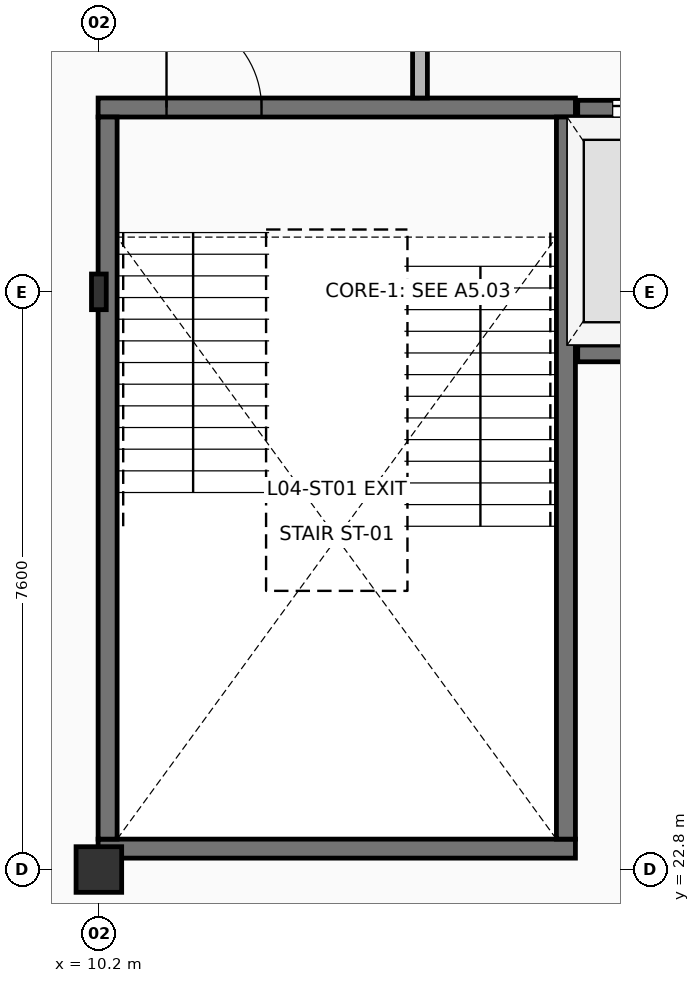
"""IFC4 building model, lengths in metres.
Left out: names, types, materials, properties, quantities, classifications, styles, units other than length and angle.
Written with IfcOpenShell. Run it as: python <this file> out.ifc"""

import sys

from ifc_helpers import new_model, si_unit, direction, frame, frame_2d, origin, origin_2d, place, context, subcontext, project, spatial, rectangle, i_section, extrude, element, fill, save


model = new_model("IFC4")
c1 = context("Model", 3, precision=1e-05, world=origin(), true_north=direction((0.0, 1.0)))
c2 = subcontext(c1, "Body", "Model", "MODEL_VIEW")
j1 = project(units=[si_unit("LENGTHUNIT", "METRE"), si_unit("PLANEANGLEUNIT", "RADIAN")], contexts=[c1])
p1 = place(None, origin())
s1 = spatial("IfcSite", under=j1, at=p1, CompositionType="ELEMENT")
p2 = place(p1, origin())
s2 = spatial("IfcBuilding", under=s1, at=p2, CompositionType="ELEMENT")
p3 = place(p2, frame((0.0, 0.0, 15.3)))
s3 = spatial("IfcBuildingStorey", under=s2, at=p3, CompositionType="ELEMENT", Elevation=15.3)
p4 = place(p3, frame((10.2, 22.8, 0.0), z_axis=(0.0, 0.0, 1.0), x_axis=(1.0, 0.0, 0.0)))
e1 = element("IfcColumn", 1, at=p4, inside=s3, PredefinedType="COLUMN", context=c2, shape_type="SweptSolid", body=[
    extrude(rectangle(XDim=0.6, YDim=0.6, at=origin_2d()), origin(), (0.0, 0.0, 1.0), 4.5),
])
p5 = place(p3, frame((10.2, 30.4, 0.0), z_axis=(0.0, 0.0, 1.0), x_axis=(1.0, 0.0, 0.0)))
e2 = element("IfcColumn", 2, at=p5, inside=s3, PredefinedType="COLUMN", context=c2, shape_type="SweptSolid", body=[
    extrude(i_section(OverallWidth=0.194, OverallDepth=0.469, WebThickness=0.013, FlangeThickness=0.021, at=origin_2d()), origin(), (0.0, 0.0, 1.0), 4.5),
])
p6 = place(p3, frame((10.19, 23.075, 0.0), z_axis=(0.0, 0.0, 1.0), x_axis=(1.0, 0.0, 0.0)))
e3 = element("IfcWall", 3, at=p6, inside=s3, PredefinedType="SHEAR", context=c2, shape_type="SweptSolid", body=[
    extrude(rectangle(XDim=6.28, YDim=0.25, at=frame_2d((3.14, 0.0))), origin(), (0.0, 0.0, 1.0), 4.29),
])
p7 = place(p3, frame((10.19, 32.825, 0.0), z_axis=(0.0, 0.0, 1.0), x_axis=(1.0, 0.0, 0.0)))
e4 = element("IfcWall", 4, at=p7, inside=s3, PredefinedType="SHEAR", context=c2, shape_type="SweptSolid", body=[
    extrude(rectangle(XDim=6.28, YDim=0.25, at=frame_2d((3.14, 0.0))), origin(), (0.0, 0.0, 1.0), 4.29),
])
p8 = place(p7, frame((0.9, 0.0, 0.0)))
e5 = element("IfcOpeningElement", 5, at=p8, cuts=e4, PredefinedType="OPENING", context=c2, shape_type="SweptSolid", body=[
    extrude(rectangle(XDim=1.25, YDim=2.2, at=frame_2d((0.625, 1.1))), frame((0.0, 0.135, 0.0), z_axis=(0.0, -1.0, 0.0), x_axis=(1.0, 0.0, 0.0)), (0.0, 0.0, 1.0), 0.27),
])
for number, where, z_axis, x_axis in (
    (6, (10.315, 23.2, 0.0), (0.0, 0.0, 1.0), (0.0, 1.0, 0.0)),
    (7, (16.345, 23.2, 0.0), (0.0, 0.0, 1.0), (0.0, 1.0, 0.0)),
):
    element("IfcWall", number, at=place(p3, frame(where, z_axis=z_axis, x_axis=x_axis)), inside=s3, PredefinedType="SHEAR", context=c2, shape_type="SweptSolid", body=[
        extrude(rectangle(XDim=9.5, YDim=0.25, at=frame_2d((4.75, 0.0))), origin(), (0.0, 0.0, 1.0), 4.29),
    ])
p9 = place(p3, frame((16.5, 29.59, 0.0), z_axis=(0.0, 0.0, 1.0), x_axis=(1.0, 0.0, 0.0)))
e8 = element("IfcWall", 8, at=p9, inside=s3, PredefinedType="SHEAR", context=c2, shape_type="SweptSolid", body=[
    extrude(rectangle(XDim=2.12, YDim=0.22, at=frame_2d((1.06, 0.0))), origin(), (0.0, 0.0, 1.0), 4.29),
])
p10 = place(p3, frame((16.5, 32.81, 0.0), z_axis=(0.0, 0.0, 1.0), x_axis=(1.0, 0.0, 0.0)))
e9 = element("IfcWall", 9, at=p10, inside=s3, PredefinedType="SHEAR", context=c2, shape_type="SweptSolid", body=[
    extrude(rectangle(XDim=2.12, YDim=0.22, at=frame_2d((1.06, 0.0))), origin(), (0.0, 0.0, 1.0), 4.29),
])
p11 = place(p10, frame((0.46, 0.0, 0.0)))
e10 = element("IfcOpeningElement", 10, at=p11, cuts=e9, PredefinedType="OPENING", context=c2, shape_type="SweptSolid", body=[
    extrude(rectangle(XDim=1.2, YDim=2.2, at=frame_2d((0.6, 1.1))), frame((0.0, 0.12, 0.0), z_axis=(0.0, -1.0, 0.0), x_axis=(1.0, 0.0, 0.0)), (0.0, 0.0, 1.0), 0.24),
])
p12 = place(p3, frame((14.425, 32.95, 0.0), z_axis=(0.0, 0.0, 1.0), x_axis=(0.0, 1.0, 0.0)))
e11 = element("IfcWall", 11, at=p12, inside=s3, PredefinedType="PARTITIONING", context=c2, shape_type="SweptSolid", body=[
    extrude(rectangle(XDim=4.5, YDim=0.195, at=frame_2d((2.25, 0.0))), origin(), (0.0, 0.0, 1.0), 4.29),
])
p13 = place(p12, frame((1.7, 0.0, 0.0)))
e12 = element("IfcOpeningElement", 12, at=p13, cuts=e11, PredefinedType="OPENING", context=c2, shape_type="SweptSolid", body=[
    extrude(rectangle(XDim=1.1, YDim=2.15, at=frame_2d((0.55, 1.075))), frame((0.0, 0.107, 0.0), z_axis=(0.0, -1.0, 0.0), x_axis=(1.0, 0.0, 0.0)), (0.0, 0.0, 1.0), 0.215),
])
p14 = place(p8, origin())
e13 = element("IfcDoor", 13, at=p14, inside=s3, OperationType="SINGLE_SWING_LEFT", PredefinedType="DOOR", context=c2, shape_type="SweptSolid", body=[
    extrude(rectangle(XDim=1.25, YDim=2.2, at=frame_2d((0.625, 1.1))), frame((0.0, 0.025, 0.0), z_axis=(0.0, -1.0, 0.0), x_axis=(1.0, 0.0, 0.0)), (0.0, 0.0, 1.0), 0.05),
])
fill(e5, e13)
p15 = place(p11, origin())
e14 = element("IfcDoor", 14, at=p15, inside=s3, OperationType="DOUBLE_DOOR_SLIDING", PredefinedType="DOOR", context=c2, shape_type="SweptSolid", body=[
    extrude(rectangle(XDim=1.2, YDim=2.2, at=frame_2d((0.6, 1.1))), frame((0.0, 0.025, 0.0), z_axis=(0.0, -1.0, 0.0), x_axis=(1.0, 0.0, 0.0)), (0.0, 0.0, 1.0), 0.05),
])
fill(e10, e14)
save(model, sys.argv[1])
